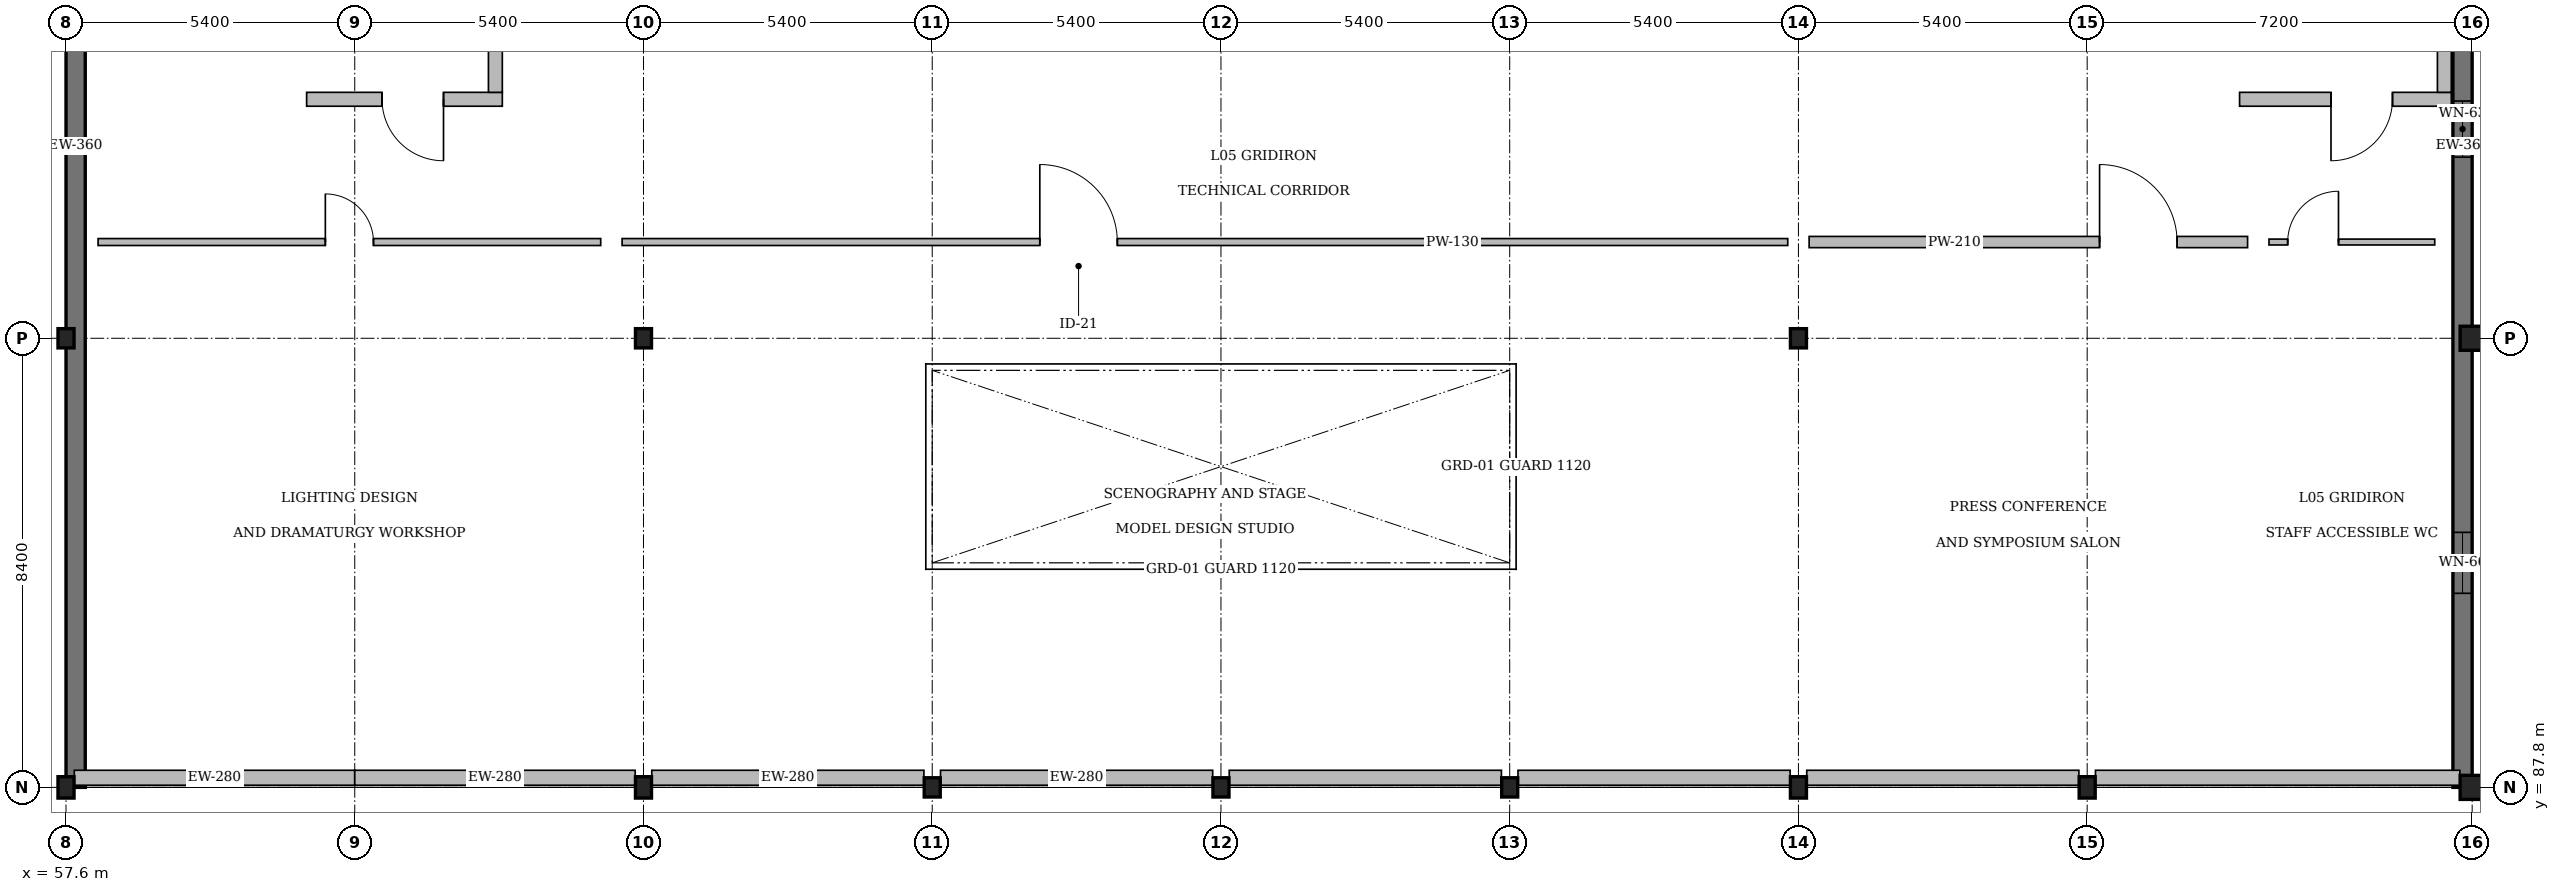
"""IFC4 building model, lengths in metres.
Left out: names, types, materials, properties, quantities, classifications, styles, units other than length and angle.
Written with IfcOpenShell. Run it as: python <this file> out.ifc"""

import sys

from ifc_helpers import new_model, si_unit, direction, frame, frame_2d, origin, origin_2d, place, context, subcontext, project, spatial, rectangle, i_section, extrude, element, fill, save


model = new_model("IFC4")
c1 = context("Model", 3, precision=1e-05, world=origin(), true_north=direction((0.0, 1.0)))
c2 = subcontext(c1, "Body", "Model", "MODEL_VIEW")
j1 = project(units=[si_unit("LENGTHUNIT", "METRE"), si_unit("PLANEANGLEUNIT", "RADIAN")], contexts=[c1])
p1 = place(None, origin())
s1 = spatial("IfcSite", under=j1, at=p1, CompositionType="ELEMENT")
p2 = place(p1, origin())
s2 = spatial("IfcBuilding", under=s1, at=p2, CompositionType="ELEMENT")
p3 = place(p2, frame((0.0, 0.0, 21.0)))
s3 = spatial("IfcBuildingStorey", under=s2, at=p3, CompositionType="ELEMENT", Elevation=21.0)
p4 = place(p3, frame((68.4, 87.8, 0.0), z_axis=(0.0, 0.0, 1.0), x_axis=(1.0, 0.0, 0.0)))
e1 = element("IfcColumn", 1, at=p4, inside=s3, PredefinedType="COLUMN", context=c2, shape_type="SweptSolid", body=[
    extrude(i_section(OverallWidth=0.3, OverallDepth=0.4, WebThickness=0.013, FlangeThickness=0.024, FilletRadius=0.027, at=origin_2d()), origin(), (0.0, 0.0, 1.0), 3.9),
])
for number, where, z_axis, x_axis in (
    (2, (68.4, 96.2, 0.0), (0.0, 0.0, 1.0), (1.0, 0.0, 0.0)),
    (3, (73.8, 87.8, 0.0), (0.0, 0.0, 1.0), (1.0, 0.0, 0.0)),
    (4, (79.2, 87.8, 0.0), (0.0, 0.0, 1.0), (1.0, 0.0, 0.0)),
    (5, (84.6, 87.8, 0.0), (0.0, 0.0, 1.0), (1.0, 0.0, 0.0)),
):
    element("IfcColumn", number, at=place(p3, frame(where, z_axis=z_axis, x_axis=x_axis)), inside=s3, PredefinedType="COLUMN", context=c2, shape_type="SweptSolid", body=[
        extrude(i_section(OverallWidth=0.3, OverallDepth=0.36, WebThickness=0.012, FlangeThickness=0.022, FilletRadius=0.027, at=origin_2d()), origin(), (0.0, 0.0, 1.0), 3.9),
    ])
p5 = place(p3, frame((90.0, 87.8, 0.0), z_axis=(0.0, 0.0, 1.0), x_axis=(1.0, 0.0, 0.0)))
e6 = element("IfcColumn", 6, at=p5, inside=s3, PredefinedType="COLUMN", context=c2, shape_type="SweptSolid", body=[
    extrude(i_section(OverallWidth=0.3, OverallDepth=0.4, WebThickness=0.013, FlangeThickness=0.024, FilletRadius=0.027, at=origin_2d()), origin(), (0.0, 0.0, 1.0), 3.9),
])
p6 = place(p3, frame((90.0, 96.2, 0.0), z_axis=(0.0, 0.0, 1.0), x_axis=(1.0, 0.0, 0.0)))
e7 = element("IfcColumn", 7, at=p6, inside=s3, PredefinedType="COLUMN", context=c2, shape_type="SweptSolid", body=[
    extrude(i_section(OverallWidth=0.3, OverallDepth=0.36, WebThickness=0.012, FlangeThickness=0.022, FilletRadius=0.027, at=origin_2d()), origin(), (0.0, 0.0, 1.0), 3.9),
])
p7 = place(p3, frame((95.4, 87.8, 0.0), z_axis=(0.0, 0.0, 1.0), x_axis=(1.0, 0.0, 0.0)))
e8 = element("IfcColumn", 8, at=p7, inside=s3, PredefinedType="COLUMN", context=c2, shape_type="SweptSolid", body=[
    extrude(i_section(OverallWidth=0.3, OverallDepth=0.4, WebThickness=0.013, FlangeThickness=0.024, FilletRadius=0.027, at=origin_2d()), origin(), (0.0, 0.0, 1.0), 3.9),
])
for number, where, z_axis, x_axis in (
    (9, (102.6, 87.8, 0.0), (0.0, 0.0, 1.0), (1.0, 0.0, 0.0)),
    (10, (102.6, 96.2, 0.0), (0.0, 0.0, 1.0), (1.0, 0.0, 0.0)),
):
    element("IfcColumn", number, at=place(p3, frame(where, z_axis=z_axis, x_axis=x_axis)), inside=s3, PredefinedType="COLUMN", context=c2, shape_type="SweptSolid", body=[
        extrude(rectangle(XDim=0.45, YDim=0.45, at=origin_2d()), origin(), (0.0, 0.0, 1.0), 3.9),
    ])
p8 = place(p3, frame((57.6, 87.8, 0.0), z_axis=(0.0, 0.0, 1.0), x_axis=(1.0, 0.0, 0.0)))
e11 = element("IfcColumn", 11, at=p8, inside=s3, PredefinedType="COLUMN", context=c2, shape_type="SweptSolid", body=[
    extrude(i_section(OverallWidth=0.3, OverallDepth=0.4, WebThickness=0.013, FlangeThickness=0.024, FilletRadius=0.027, at=origin_2d()), origin(), (0.0, 0.0, 1.0), 3.9),
])
p9 = place(p3, frame((57.6, 96.2, 0.0), z_axis=(0.0, 0.0, 1.0), x_axis=(1.0, 0.0, 0.0)))
e12 = element("IfcColumn", 12, at=p9, inside=s3, PredefinedType="COLUMN", context=c2, shape_type="SweptSolid", body=[
    extrude(i_section(OverallWidth=0.3, OverallDepth=0.36, WebThickness=0.012, FlangeThickness=0.022, FilletRadius=0.027, at=origin_2d()), origin(), (0.0, 0.0, 1.0), 3.9),
])
p10 = place(p3, frame((102.21, 100.67, 0.0), z_axis=(0.0, 0.0, 1.0), x_axis=(-1.0, 0.0, 0.0)))
e13 = element("IfcWall", 13, at=p10, inside=s3, PredefinedType="SOLIDWALL", context=c2, shape_type="SweptSolid", body=[
    extrude(rectangle(XDim=3.96, YDim=0.26, at=frame_2d((1.98, 0.0))), origin(), (0.0, 0.0, 1.0), 3.66),
])
p11 = place(p10, frame((1.1, 0.0, 0.0)))
e14 = element("IfcOpeningElement", 14, at=p11, cuts=e13, PredefinedType="OPENING", context=c2, shape_type="SweptSolid", body=[
    extrude(rectangle(XDim=1.15, YDim=2.2, at=frame_2d((0.575, 1.1))), frame((0.0, 0.15, 0.0), z_axis=(0.0, -1.0, 0.0), x_axis=(1.0, 0.0, 0.0)), (0.0, 0.0, 1.0), 0.3),
])
p12 = place(p3, frame((102.08, 106.65, 0.0), z_axis=(0.0, 0.0, 1.0), x_axis=(0.0, -1.0, 0.0)))
e15 = element("IfcWall", 15, at=p12, inside=s3, PredefinedType="SOLIDWALL", context=c2, shape_type="SweptSolid", body=[
    extrude(rectangle(XDim=5.85, YDim=0.26, at=frame_2d((2.925, 0.0))), origin(), (0.0, 0.0, 1.0), 3.66),
])
p13 = place(p3, frame((65.76, 100.67, 0.0), z_axis=(0.0, 0.0, 1.0), x_axis=(-1.0, 0.0, 0.0)))
e16 = element("IfcWall", 16, at=p13, inside=s3, PredefinedType="SOLIDWALL", context=c2, shape_type="SweptSolid", body=[
    extrude(rectangle(XDim=3.66, YDim=0.26, at=frame_2d((1.83, 0.0))), origin(), (0.0, 0.0, 1.0), 3.66),
])
p14 = place(p13, frame((1.1, 0.0, 0.0)))
e17 = element("IfcOpeningElement", 17, at=p14, cuts=e16, PredefinedType="OPENING", context=c2, shape_type="SweptSolid", body=[
    extrude(rectangle(XDim=1.15, YDim=2.2, at=frame_2d((0.575, 1.1))), frame((0.0, 0.15, 0.0), z_axis=(0.0, -1.0, 0.0), x_axis=(1.0, 0.0, 0.0)), (0.0, 0.0, 1.0), 0.3),
])
p15 = place(p3, frame((65.63, 106.65, 0.0), z_axis=(0.0, 0.0, 1.0), x_axis=(0.0, -1.0, 0.0)))
e18 = element("IfcWall", 18, at=p15, inside=s3, PredefinedType="SOLIDWALL", context=c2, shape_type="SweptSolid", body=[
    extrude(rectangle(XDim=5.85, YDim=0.26, at=frame_2d((2.925, 0.0))), origin(), (0.0, 0.0, 1.0), 3.66),
])
p16 = place(p3, frame((57.78, 87.8, 0.0), z_axis=(0.0, 0.0, 1.0), x_axis=(0.0, 1.0, 0.0)))
e19 = element("IfcWall", 19, at=p16, inside=s3, PredefinedType="SOLIDWALL", context=c2, shape_type="SweptSolid", body=[
    extrude(rectangle(XDim=24.0, YDim=0.36, at=frame_2d((12.0, 0.0))), origin(), (0.0, 0.0, 1.0), 3.65),
])
p17 = place(p3, frame((102.42, 87.8, 0.0), z_axis=(0.0, 0.0, 1.0), x_axis=(0.0, 1.0, 0.0)))
e20 = element("IfcWall", 20, at=p17, inside=s3, PredefinedType="SOLIDWALL", context=c2, shape_type="SweptSolid", body=[
    extrude(rectangle(XDim=24.0, YDim=0.36, at=frame_2d((12.0, 0.0))), origin(), (0.0, 0.0, 1.0), 3.65),
])
p18 = place(p17, frame((3.63, 0.0, 0.95)))
e21 = element("IfcOpeningElement", 21, at=p18, cuts=e20, PredefinedType="OPENING", context=c2, shape_type="SweptSolid", body=[
    extrude(rectangle(XDim=1.14, YDim=1.85, at=frame_2d((0.57, 0.925))), frame((0.0, 0.2, 0.0), z_axis=(0.0, -1.0, 0.0), x_axis=(1.0, 0.0, 0.0)), (0.0, 0.0, 1.0), 0.4),
])
p19 = place(p17, frame((11.788, 0.0, 0.95)))
e22 = element("IfcOpeningElement", 22, at=p19, cuts=e20, PredefinedType="OPENING", context=c2, shape_type="SweptSolid", body=[
    extrude(rectangle(XDim=1.05, YDim=1.85, at=frame_2d((0.525, 0.925))), frame((0.0, 0.2, 0.0), z_axis=(0.0, -1.0, 0.0), x_axis=(1.0, 0.0, 0.0)), (0.0, 0.0, 1.0), 0.4),
])
p20 = place(p17, frame((19.55, 0.0, 0.95)))
e23 = element("IfcOpeningElement", 23, at=p20, cuts=e20, PredefinedType="OPENING", context=c2, shape_type="SweptSolid", body=[
    extrude(rectangle(XDim=1.05, YDim=1.6, at=frame_2d((0.525, 0.8))), frame((0.0, 0.2, 0.0), z_axis=(0.0, -1.0, 0.0), x_axis=(1.0, 0.0, 0.0)), (0.0, 0.0, 1.0), 0.4),
])
for number, where, z_axis, x_axis in (
    (24, (57.755, 87.98, 0.0), (0.0, 0.0, 1.0), (1.0, 0.0, 0.0)),
    (25, (63.0, 87.98, 0.0), (0.0, 0.0, 1.0), (1.0, 0.0, 0.0)),
):
    element("IfcWall", number, at=place(p3, frame(where, z_axis=z_axis, x_axis=x_axis)), inside=s3, PredefinedType="SOLIDWALL", context=c2, shape_type="SweptSolid", body=[
        extrude(rectangle(XDim=5.245, YDim=0.28, at=frame_2d((2.623, 0.0))), origin(), (0.0, 0.0, 1.0), 2.643),
    ])
p21 = place(p3, frame((68.555, 87.98, 0.0), z_axis=(0.0, 0.0, 1.0), x_axis=(1.0, 0.0, 0.0)))
e26 = element("IfcWall", 26, at=p21, inside=s3, PredefinedType="SOLIDWALL", context=c2, shape_type="SweptSolid", body=[
    extrude(rectangle(XDim=5.09, YDim=0.28, at=frame_2d((2.545, 0.0))), origin(), (0.0, 0.0, 1.0), 3.253),
])
p22 = place(p3, frame((73.955, 87.98, 1.259), z_axis=(0.0, 0.0, 1.0), x_axis=(1.0, 0.0, 0.0)))
e27 = element("IfcWall", 27, at=p22, inside=s3, PredefinedType="SOLIDWALL", context=c2, shape_type="SweptSolid", body=[
    extrude(rectangle(XDim=5.09, YDim=0.28, at=frame_2d((2.545, 0.0))), origin(), (0.0, 0.0, 1.0), 1.994),
])
for number, where, z_axis, x_axis in (
    (28, (79.355, 87.98, 0.0), (0.0, 0.0, 1.0), (1.0, 0.0, 0.0)),
    (29, (84.755, 87.98, 0.0), (0.0, 0.0, 1.0), (1.0, 0.0, 0.0)),
    (30, (90.155, 87.98, 0.0), (0.0, 0.0, 1.0), (1.0, 0.0, 0.0)),
):
    element("IfcWall", number, at=place(p3, frame(where, z_axis=z_axis, x_axis=x_axis)), inside=s3, PredefinedType="SOLIDWALL", context=c2, shape_type="SweptSolid", body=[
        extrude(rectangle(XDim=5.09, YDim=0.28, at=frame_2d((2.545, 0.0))), origin(), (0.0, 0.0, 1.0), 3.253),
    ])
p23 = place(p3, frame((95.555, 87.98, 0.0), z_axis=(0.0, 0.0, 1.0), x_axis=(1.0, 0.0, 0.0)))
e31 = element("IfcWall", 31, at=p23, inside=s3, PredefinedType="SOLIDWALL", context=c2, shape_type="SweptSolid", body=[
    extrude(rectangle(XDim=6.815, YDim=0.28, at=frame_2d((3.408, 0.0))), origin(), (0.0, 0.0, 1.0), 2.993),
])
p24 = place(p3, frame((68.0, 98.0, 0.0), z_axis=(0.0, 0.0, 1.0), x_axis=(1.0, 0.0, 0.0)))
e32 = element("IfcWall", 32, at=p24, inside=s3, PredefinedType="PARTITIONING", context=c2, shape_type="SweptSolid", body=[
    extrude(rectangle(XDim=21.8, YDim=0.13, at=frame_2d((10.9, 0.0))), origin(), (0.0, 0.0, 1.0), 3.66),
])
p25 = place(p24, frame((7.812, 0.0, 0.0)))
e33 = element("IfcOpeningElement", 33, at=p25, cuts=e32, PredefinedType="OPENING", context=c2, shape_type="SweptSolid", body=[
    extrude(rectangle(XDim=1.45, YDim=2.2, at=frame_2d((0.725, 1.1))), frame((0.0, 0.085, 0.0), z_axis=(0.0, -1.0, 0.0), x_axis=(1.0, 0.0, 0.0)), (0.0, 0.0, 1.0), 0.17),
])
p26 = place(p3, frame((58.2, 98.0, 0.0), z_axis=(0.0, 0.0, 1.0), x_axis=(1.0, 0.0, 0.0)))
e34 = element("IfcWall", 34, at=p26, inside=s3, PredefinedType="PARTITIONING", context=c2, shape_type="SweptSolid", body=[
    extrude(rectangle(XDim=9.4, YDim=0.13, at=frame_2d((4.7, 0.0))), origin(), (0.0, 0.0, 1.0), 3.66),
])
p27 = place(p26, frame((4.25, 0.0, 0.0)))
e35 = element("IfcOpeningElement", 35, at=p27, cuts=e34, PredefinedType="OPENING", context=c2, shape_type="SweptSolid", body=[
    extrude(rectangle(XDim=0.9, YDim=2.15, at=frame_2d((0.45, 1.075))), frame((0.0, 0.085, 0.0), z_axis=(0.0, -1.0, 0.0), x_axis=(1.0, 0.0, 0.0)), (0.0, 0.0, 1.0), 0.17),
])
p28 = place(p3, frame((90.2, 98.0, 0.0), z_axis=(0.0, 0.0, 1.0), x_axis=(1.0, 0.0, 0.0)))
e36 = element("IfcWall", 36, at=p28, inside=s3, PredefinedType="PARTITIONING", context=c2, shape_type="SweptSolid", body=[
    extrude(rectangle(XDim=8.2, YDim=0.21, at=frame_2d((4.1, 0.0))), origin(), (0.0, 0.0, 1.0), 3.66),
])
p29 = place(p28, frame((5.432, 0.0, 0.0)))
e37 = element("IfcOpeningElement", 37, at=p29, cuts=e36, PredefinedType="OPENING", context=c2, shape_type="SweptSolid", body=[
    extrude(rectangle(XDim=1.45, YDim=2.2, at=frame_2d((0.725, 1.1))), frame((0.0, 0.125, 0.0), z_axis=(0.0, -1.0, 0.0), x_axis=(1.0, 0.0, 0.0)), (0.0, 0.0, 1.0), 0.25),
])
p30 = place(p3, frame((98.8, 98.0, 0.0), z_axis=(0.0, 0.0, 1.0), x_axis=(1.0, 0.0, 0.0)))
e38 = element("IfcWall", 38, at=p30, inside=s3, PredefinedType="PARTITIONING", context=c2, shape_type="SweptSolid", body=[
    extrude(rectangle(XDim=3.1, YDim=0.11, at=frame_2d((1.55, 0.0))), origin(), (0.0, 0.0, 1.0), 3.66),
])
p31 = place(p30, frame((0.35, 0.0, 0.0)))
e39 = element("IfcOpeningElement", 39, at=p31, cuts=e38, PredefinedType="OPENING", context=c2, shape_type="SweptSolid", body=[
    extrude(rectangle(XDim=0.95, YDim=2.1, at=frame_2d((0.475, 1.05))), frame((0.0, 0.075, 0.0), z_axis=(0.0, -1.0, 0.0), x_axis=(1.0, 0.0, 0.0)), (0.0, 0.0, 1.0), 0.15),
])
p32 = place(p11, origin())
e40 = element("IfcDoor", 40, at=p32, inside=s3, OperationType="SINGLE_SWING_RIGHT", PredefinedType="DOOR", context=c2, shape_type="SweptSolid", body=[
    extrude(rectangle(XDim=1.15, YDim=2.2, at=frame_2d((0.575, 1.1))), frame((0.0, 0.025, 0.0), z_axis=(0.0, -1.0, 0.0), x_axis=(1.0, 0.0, 0.0)), (0.0, 0.0, 1.0), 0.05),
])
fill(e14, e40)
p33 = place(p14, origin())
e41 = element("IfcDoor", 41, at=p33, inside=s3, OperationType="SINGLE_SWING_LEFT", PredefinedType="DOOR", context=c2, shape_type="SweptSolid", body=[
    extrude(rectangle(XDim=1.15, YDim=2.2, at=frame_2d((0.575, 1.1))), frame((0.0, 0.025, 0.0), z_axis=(0.0, -1.0, 0.0), x_axis=(1.0, 0.0, 0.0)), (0.0, 0.0, 1.0), 0.05),
])
fill(e17, e41)
p34 = place(p18, origin())
e42 = element("IfcWindow", 42, at=p34, inside=s3, PartitioningType="SINGLE_PANEL", PredefinedType="WINDOW", context=c2, shape_type="SweptSolid", body=[
    extrude(rectangle(XDim=1.14, YDim=1.85, at=frame_2d((0.57, 0.925))), frame((0.0, 0.03, 0.0), z_axis=(0.0, -1.0, 0.0), x_axis=(1.0, 0.0, 0.0)), (0.0, 0.0, 1.0), 0.06),
])
fill(e21, e42)
p35 = place(p19, origin())
e43 = element("IfcWindow", 43, at=p35, inside=s3, PartitioningType="SINGLE_PANEL", PredefinedType="WINDOW", context=c2, shape_type="SweptSolid", body=[
    extrude(rectangle(XDim=1.05, YDim=1.85, at=frame_2d((0.525, 0.925))), frame((0.0, 0.03, 0.0), z_axis=(0.0, -1.0, 0.0), x_axis=(1.0, 0.0, 0.0)), (0.0, 0.0, 1.0), 0.06),
])
fill(e22, e43)
p36 = place(p25, origin())
e44 = element("IfcDoor", 44, at=p36, inside=s3, OperationType="DOUBLE_DOOR_SINGLE_SWING", PredefinedType="DOOR", context=c2, shape_type="SweptSolid", body=[
    extrude(rectangle(XDim=1.45, YDim=2.2, at=frame_2d((0.725, 1.1))), frame((0.0, 0.025, 0.0), z_axis=(0.0, -1.0, 0.0), x_axis=(1.0, 0.0, 0.0)), (0.0, 0.0, 1.0), 0.05),
])
fill(e33, e44)
p37 = place(p27, origin())
e45 = element("IfcDoor", 45, at=p37, inside=s3, OperationType="SINGLE_SWING_LEFT", PredefinedType="DOOR", context=c2, shape_type="SweptSolid", body=[
    extrude(rectangle(XDim=0.9, YDim=2.15, at=frame_2d((0.45, 1.075))), frame((0.0, 0.025, 0.0), z_axis=(0.0, -1.0, 0.0), x_axis=(1.0, 0.0, 0.0)), (0.0, 0.0, 1.0), 0.05),
])
fill(e35, e45)
p38 = place(p29, origin())
e46 = element("IfcDoor", 46, at=p38, inside=s3, OperationType="DOUBLE_DOOR_SINGLE_SWING", PredefinedType="DOOR", context=c2, shape_type="SweptSolid", body=[
    extrude(rectangle(XDim=1.45, YDim=2.2, at=frame_2d((0.725, 1.1))), frame((0.0, 0.025, 0.0), z_axis=(0.0, -1.0, 0.0), x_axis=(1.0, 0.0, 0.0)), (0.0, 0.0, 1.0), 0.05),
])
fill(e37, e46)
p39 = place(p31, origin())
e47 = element("IfcDoor", 47, at=p39, inside=s3, OperationType="SINGLE_SWING_RIGHT", PredefinedType="DOOR", context=c2, shape_type="SweptSolid", body=[
    extrude(rectangle(XDim=0.95, YDim=2.1, at=frame_2d((0.475, 1.05))), frame((0.0, 0.025, 0.0), z_axis=(0.0, -1.0, 0.0), x_axis=(1.0, 0.0, 0.0)), (0.0, 0.0, 1.0), 0.05),
])
fill(e39, e47)
save(model, sys.argv[1])
